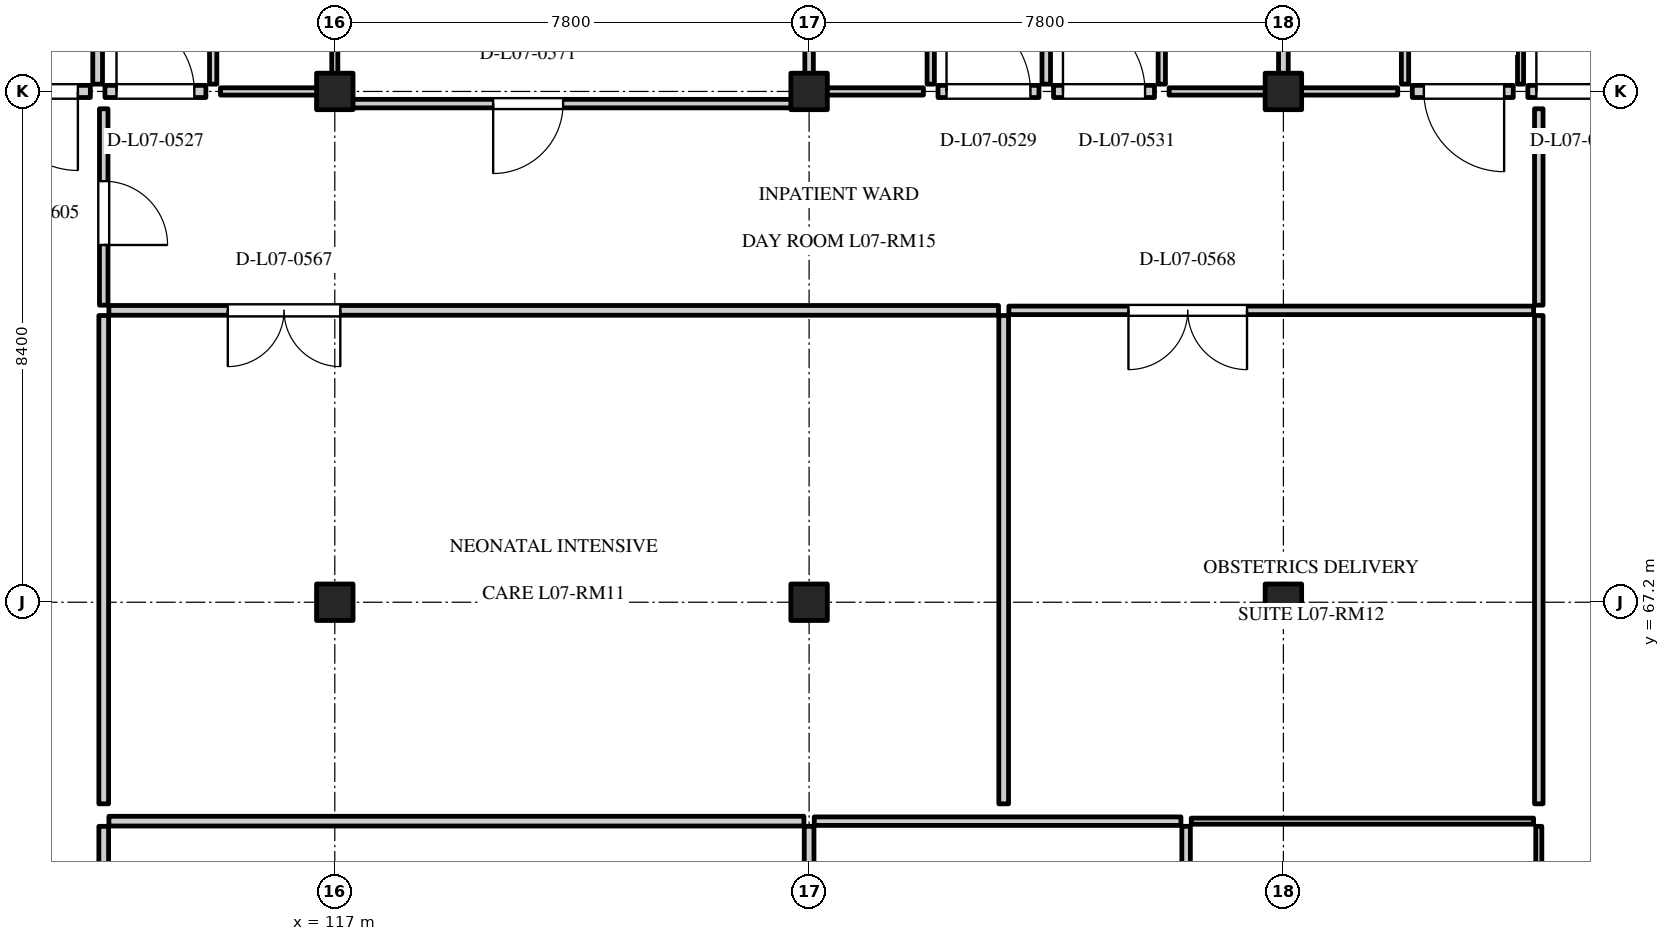
"""IFC4 building model, lengths in metres.
Left out: names, types, materials, properties, quantities, classifications, styles, units other than length and angle.
Written with IfcOpenShell. Run it as: python <this file> out.ifc"""

import sys

from ifc_helpers import new_model, si_unit, direction, frame, frame_2d, origin, origin_2d, place, context, subcontext, project, spatial, rectangle, extrude, element, fill, save


model = new_model("IFC4")
c1 = context("Model", 3, precision=1e-05, world=origin(), true_north=direction((0.0, 1.0)))
c2 = subcontext(c1, "Body", "Model", "MODEL_VIEW")
j1 = project(units=[si_unit("LENGTHUNIT", "METRE"), si_unit("PLANEANGLEUNIT", "RADIAN")], contexts=[c1])
p1 = place(None, origin())
s1 = spatial("IfcSite", under=j1, at=p1, CompositionType="ELEMENT")
p2 = place(p1, origin())
s2 = spatial("IfcBuilding", under=s1, at=p2, CompositionType="ELEMENT")
p3 = place(p2, frame((0.0, 0.0, 29.7)))
s3 = spatial("IfcBuildingStorey", under=s2, at=p3, CompositionType="ELEMENT", Elevation=29.7)
for number, where, z_axis, x_axis in (
    (1, (117.0, 67.2, 0.0), (0.0, 0.0, 1.0), (1.0, 0.0, 0.0)),
    (2, (117.0, 75.6, 0.0), (0.0, 0.0, 1.0), (1.0, 0.0, 0.0)),
    (3, (124.8, 67.2, 0.0), (0.0, 0.0, 1.0), (1.0, 0.0, 0.0)),
    (4, (124.8, 75.6, 0.0), (0.0, 0.0, 1.0), (1.0, 0.0, 0.0)),
    (5, (132.6, 67.2, 0.0), (0.0, 0.0, 1.0), (1.0, 0.0, 0.0)),
    (6, (132.6, 75.6, 0.0), (0.0, 0.0, 1.0), (1.0, 0.0, 0.0)),
):
    element("IfcColumn", number, at=place(p3, frame(where, z_axis=z_axis, x_axis=x_axis)), inside=s3, PredefinedType="COLUMN", context=c2, shape_type="SweptSolid", body=[
        extrude(rectangle(XDim=0.6, YDim=0.6, at=origin_2d()), origin(), (0.0, 0.0, 1.0), 4.2),
    ])
p4 = place(p3, frame((113.1, 75.72, 0.0), z_axis=(0.0, 0.0, 1.0), x_axis=(0.0, 1.0, 0.0)))
e7 = element("IfcWall", 7, at=p4, inside=s3, PredefinedType="PARTITIONING", context=c2, shape_type="SweptSolid", body=[
    extrude(rectangle(XDim=8.16, YDim=0.16, at=frame_2d((4.08, 0.0))), origin(), (0.0, 0.0, 1.0), 3.88),
])
p5 = place(p3, frame((111.32, 75.6, 0.0), z_axis=(0.0, 0.0, 1.0), x_axis=(1.0, 0.0, 0.0)))
e8 = element("IfcWall", 8, at=p5, inside=s3, PredefinedType="STANDARD", context=c2, shape_type="SweptSolid", body=[
    extrude(rectangle(XDim=1.66, YDim=0.2, at=frame_2d((0.83, 0.0))), origin(), (0.0, 0.0, 1.0), 3.25),
])
p6 = place(p5, frame((0.155, 0.0, 0.0)))
e9 = element("IfcOpeningElement", 9, at=p6, cuts=e8, PredefinedType="OPENING", context=c2, shape_type="SweptSolid", body=[
    extrude(rectangle(XDim=1.3, YDim=2.15, at=frame_2d((0.65, 1.075))), frame((0.0, 0.112, 0.0), z_axis=(0.0, -1.0, 0.0), x_axis=(1.0, 0.0, 0.0)), (0.0, 0.0, 1.0), 0.224),
])
p7 = place(p3, frame((117.0, 75.72, 0.0), z_axis=(0.0, 0.0, 1.0), x_axis=(0.0, 1.0, 0.0)))
e10 = element("IfcWall", 10, at=p7, inside=s3, PredefinedType="PARTITIONING", context=c2, shape_type="SweptSolid", body=[
    extrude(rectangle(XDim=8.16, YDim=0.1, at=frame_2d((4.08, 0.0))), origin(), (0.0, 0.0, 1.0), 3.25),
])
p8 = place(p3, frame((113.22, 75.6, 0.0), z_axis=(0.0, 0.0, 1.0), x_axis=(1.0, 0.0, 0.0)))
e11 = element("IfcWall", 11, at=p8, inside=s3, PredefinedType="STANDARD", context=c2, shape_type="SweptSolid", body=[
    extrude(rectangle(XDim=1.66, YDim=0.2, at=frame_2d((0.83, 0.0))), origin(), (0.0, 0.0, 1.0), 3.25),
])
p9 = place(p8, frame((0.19, 0.0, 0.0)))
e12 = element("IfcOpeningElement", 12, at=p9, cuts=e11, PredefinedType="OPENING", context=c2, shape_type="SweptSolid", body=[
    extrude(rectangle(XDim=1.28, YDim=2.15, at=frame_2d((0.64, 1.075))), frame((0.0, 0.112, 0.0), z_axis=(0.0, -1.0, 0.0), x_axis=(1.0, 0.0, 0.0)), (0.0, 0.0, 1.0), 0.224),
])
p10 = place(p3, frame((115.12, 75.6, 0.0), z_axis=(0.0, 0.0, 1.0), x_axis=(1.0, 0.0, 0.0)))
e13 = element("IfcWall", 13, at=p10, inside=s3, PredefinedType="PARTITIONING", context=c2, shape_type="SweptSolid", body=[
    extrude(rectangle(XDim=1.76, YDim=0.12, at=frame_2d((0.88, 0.0))), origin(), (0.0, 0.0, 1.0), 3.25),
])
p11 = place(p3, frame((115.0, 75.72, 0.0), z_axis=(0.0, 0.0, 1.0), x_axis=(0.0, 1.0, 0.0)))
e14 = element("IfcWall", 14, at=p11, inside=s3, PredefinedType="PARTITIONING", context=c2, shape_type="SweptSolid", body=[
    extrude(rectangle(XDim=2.24, YDim=0.12, at=frame_2d((1.12, 0.0))), origin(), (0.0, 0.0, 1.0), 3.88),
])
for number, where, z_axis, x_axis in (
    (15, (124.8, 75.72, 0.0), (0.0, 0.0, 1.0), (0.0, 1.0, 0.0)),
    (16, (128.7, 75.72, 0.0), (0.0, 0.0, 1.0), (0.0, 1.0, 0.0)),
):
    element("IfcWall", number, at=place(p3, frame(where, z_axis=z_axis, x_axis=x_axis)), inside=s3, PredefinedType="PARTITIONING", context=c2, shape_type="SweptSolid", body=[
        extrude(rectangle(XDim=8.16, YDim=0.14, at=frame_2d((4.08, 0.0))), origin(), (0.0, 0.0, 1.0), 3.88),
    ])
p12 = place(p3, frame((126.92, 75.6, 0.0), z_axis=(0.0, 0.0, 1.0), x_axis=(1.0, 0.0, 0.0)))
e17 = element("IfcWall", 17, at=p12, inside=s3, PredefinedType="STANDARD", context=c2, shape_type="SweptSolid", body=[
    extrude(rectangle(XDim=1.66, YDim=0.2, at=frame_2d((0.83, 0.0))), origin(), (0.0, 0.0, 1.0), 3.25),
])
p13 = place(p12, frame((0.14, 0.0, 0.0)))
e18 = element("IfcOpeningElement", 18, at=p13, cuts=e17, PredefinedType="OPENING", context=c2, shape_type="SweptSolid", body=[
    extrude(rectangle(XDim=1.38, YDim=2.2, at=frame_2d((0.69, 1.1))), frame((0.0, 0.112, 0.0), z_axis=(0.0, -1.0, 0.0), x_axis=(1.0, 0.0, 0.0)), (0.0, 0.0, 1.0), 0.224),
])
p14 = place(p3, frame((124.92, 75.6, 0.0), z_axis=(0.0, 0.0, 1.0), x_axis=(1.0, 0.0, 0.0)))
e19 = element("IfcWall", 19, at=p14, inside=s3, PredefinedType="PARTITIONING", context=c2, shape_type="SweptSolid", body=[
    extrude(rectangle(XDim=1.76, YDim=0.12, at=frame_2d((0.88, 0.0))), origin(), (0.0, 0.0, 1.0), 3.25),
])
p15 = place(p3, frame((126.8, 75.72, 0.0), z_axis=(0.0, 0.0, 1.0), x_axis=(0.0, 1.0, 0.0)))
e20 = element("IfcWall", 20, at=p15, inside=s3, PredefinedType="PARTITIONING", context=c2, shape_type="SweptSolid", body=[
    extrude(rectangle(XDim=2.24, YDim=0.12, at=frame_2d((1.12, 0.0))), origin(), (0.0, 0.0, 1.0), 3.88),
])
p16 = place(p3, frame((132.6, 75.72, 0.0), z_axis=(0.0, 0.0, 1.0), x_axis=(0.0, 1.0, 0.0)))
e21 = element("IfcWall", 21, at=p16, inside=s3, PredefinedType="PARTITIONING", context=c2, shape_type="SweptSolid", body=[
    extrude(rectangle(XDim=8.16, YDim=0.16, at=frame_2d((4.08, 0.0))), origin(), (0.0, 0.0, 1.0), 3.25),
])
p17 = place(p3, frame((128.82, 75.6, 0.0), z_axis=(0.0, 0.0, 1.0), x_axis=(1.0, 0.0, 0.0)))
e22 = element("IfcWall", 22, at=p17, inside=s3, PredefinedType="STANDARD", context=c2, shape_type="SweptSolid", body=[
    extrude(rectangle(XDim=1.66, YDim=0.2, at=frame_2d((0.83, 0.0))), origin(), (0.0, 0.0, 1.0), 3.25),
])
p18 = place(p17, frame((0.155, 0.0, 0.0)))
e23 = element("IfcOpeningElement", 23, at=p18, cuts=e22, PredefinedType="OPENING", context=c2, shape_type="SweptSolid", body=[
    extrude(rectangle(XDim=1.35, YDim=2.15, at=frame_2d((0.675, 1.075))), frame((0.0, 0.112, 0.0), z_axis=(0.0, -1.0, 0.0), x_axis=(1.0, 0.0, 0.0)), (0.0, 0.0, 1.0), 0.224),
])
p19 = place(p3, frame((130.72, 75.6, 0.0), z_axis=(0.0, 0.0, 1.0), x_axis=(1.0, 0.0, 0.0)))
e24 = element("IfcWall", 24, at=p19, inside=s3, PredefinedType="PARTITIONING", context=c2, shape_type="SweptSolid", body=[
    extrude(rectangle(XDim=1.76, YDim=0.12, at=frame_2d((0.88, 0.0))), origin(), (0.0, 0.0, 1.0), 3.25),
])
p20 = place(p3, frame((130.6, 75.72, 0.0), z_axis=(0.0, 0.0, 1.0), x_axis=(0.0, 1.0, 0.0)))
e25 = element("IfcWall", 25, at=p20, inside=s3, PredefinedType="PARTITIONING", context=c2, shape_type="SweptSolid", body=[
    extrude(rectangle(XDim=2.24, YDim=0.12, at=frame_2d((1.12, 0.0))), origin(), (0.0, 0.0, 1.0), 3.88),
])
p21 = place(p3, frame((136.5, 75.72, 0.0), z_axis=(0.0, 0.0, 1.0), x_axis=(0.0, 1.0, 0.0)))
e26 = element("IfcWall", 26, at=p21, inside=s3, PredefinedType="PARTITIONING", context=c2, shape_type="SweptSolid", body=[
    extrude(rectangle(XDim=8.16, YDim=0.1, at=frame_2d((4.08, 0.0))), origin(), (0.0, 0.0, 1.0), 3.88),
])
p22 = place(p3, frame((134.72, 75.6, 0.0), z_axis=(0.0, 0.0, 1.0), x_axis=(1.0, 0.0, 0.0)))
e27 = element("IfcWall", 27, at=p22, inside=s3, PredefinedType="STANDARD", context=c2, shape_type="SweptSolid", body=[
    extrude(rectangle(XDim=1.66, YDim=0.2, at=frame_2d((0.83, 0.0))), origin(), (0.0, 0.0, 1.0), 3.25),
])
p23 = place(p22, frame((0.19, 0.0, 0.0)))
e28 = element("IfcOpeningElement", 28, at=p23, cuts=e27, PredefinedType="OPENING", context=c2, shape_type="SweptSolid", body=[
    extrude(rectangle(XDim=1.32, YDim=2.2, at=frame_2d((0.66, 1.1))), frame((0.0, 0.112, 0.0), z_axis=(0.0, -1.0, 0.0), x_axis=(1.0, 0.0, 0.0)), (0.0, 0.0, 1.0), 0.224),
])
p24 = place(p3, frame((132.72, 75.6, 0.0), z_axis=(0.0, 0.0, 1.0), x_axis=(1.0, 0.0, 0.0)))
e29 = element("IfcWall", 29, at=p24, inside=s3, PredefinedType="PARTITIONING", context=c2, shape_type="SweptSolid", body=[
    extrude(rectangle(XDim=1.76, YDim=0.12, at=frame_2d((0.88, 0.0))), origin(), (0.0, 0.0, 1.0), 3.25),
])
p25 = place(p3, frame((134.6, 75.72, 0.0), z_axis=(0.0, 0.0, 1.0), x_axis=(0.0, 1.0, 0.0)))
e30 = element("IfcWall", 30, at=p25, inside=s3, PredefinedType="PARTITIONING", context=c2, shape_type="SweptSolid", body=[
    extrude(rectangle(XDim=2.24, YDim=0.12, at=frame_2d((1.12, 0.0))), origin(), (0.0, 0.0, 1.0), 3.88),
])
p26 = place(p3, frame((136.62, 75.6, 0.0), z_axis=(0.0, 0.0, 1.0), x_axis=(1.0, 0.0, 0.0)))
e31 = element("IfcWall", 31, at=p26, inside=s3, PredefinedType="STANDARD", context=c2, shape_type="SweptSolid", body=[
    extrude(rectangle(XDim=1.66, YDim=0.2, at=frame_2d((0.83, 0.0))), origin(), (0.0, 0.0, 1.0), 3.25),
])
p27 = place(p26, frame((0.14, 0.0, 0.0)))
e32 = element("IfcOpeningElement", 32, at=p27, cuts=e31, PredefinedType="OPENING", context=c2, shape_type="SweptSolid", body=[
    extrude(rectangle(XDim=1.38, YDim=2.2, at=frame_2d((0.69, 1.1))), frame((0.0, 0.112, 0.0), z_axis=(0.0, -1.0, 0.0), x_axis=(1.0, 0.0, 0.0)), (0.0, 0.0, 1.0), 0.224),
])
p28 = place(p3, frame((113.285, 63.6, 0.0), z_axis=(0.0, 0.0, 1.0), x_axis=(1.0, 0.0, 0.0)))
e33 = element("IfcWall", 33, at=p28, inside=s3, PredefinedType="PARTITIONING", context=c2, shape_type="SweptSolid", body=[
    extrude(rectangle(XDim=11.43, YDim=0.16, at=frame_2d((5.715, 0.0))), origin(), (0.0, 0.0, 1.0), 3.88),
])
for number, where, z_axis, x_axis in (
    (34, (113.2, 54.085, 0.0), (0.0, 0.0, 1.0), (0.0, 1.0, 0.0)),
    (35, (124.8, 54.085, 0.0), (0.0, 0.0, 1.0), (0.0, 1.0, 0.0)),
):
    element("IfcWall", number, at=place(p3, frame(where, z_axis=z_axis, x_axis=x_axis)), inside=s3, PredefinedType="PARTITIONING", context=c2, shape_type="SweptSolid", body=[
        extrude(rectangle(XDim=9.43, YDim=0.16, at=frame_2d((4.715, 0.0))), origin(), (0.0, 0.0, 1.0), 3.88),
    ])
p29 = place(p3, frame((124.885, 63.6, 0.0), z_axis=(0.0, 0.0, 1.0), x_axis=(1.0, 0.0, 0.0)))
e36 = element("IfcWall", 36, at=p29, inside=s3, PredefinedType="PARTITIONING", context=c2, shape_type="SweptSolid", body=[
    extrude(rectangle(XDim=6.03, YDim=0.14, at=frame_2d((3.015, 0.0))), origin(), (0.0, 0.0, 1.0), 3.88),
])
p30 = place(p3, frame((131.0, 54.085, 0.0), z_axis=(0.0, 0.0, 1.0), x_axis=(0.0, 1.0, 0.0)))
e37 = element("IfcWall", 37, at=p30, inside=s3, PredefinedType="PARTITIONING", context=c2, shape_type="SweptSolid", body=[
    extrude(rectangle(XDim=9.43, YDim=0.14, at=frame_2d((4.715, 0.0))), origin(), (0.0, 0.0, 1.0), 3.88),
])
p31 = place(p3, frame((131.085, 63.6, 0.0), z_axis=(0.0, 0.0, 1.0), x_axis=(1.0, 0.0, 0.0)))
e38 = element("IfcWall", 38, at=p31, inside=s3, PredefinedType="PARTITIONING", context=c2, shape_type="SweptSolid", body=[
    extrude(rectangle(XDim=5.63, YDim=0.1, at=frame_2d((2.815, 0.0))), origin(), (0.0, 0.0, 1.0), 3.88),
])
p32 = place(p3, frame((136.8, 54.085, 0.0), z_axis=(0.0, 0.0, 1.0), x_axis=(0.0, 1.0, 0.0)))
e39 = element("IfcWall", 39, at=p32, inside=s3, PredefinedType="PARTITIONING", context=c2, shape_type="SweptSolid", body=[
    extrude(rectangle(XDim=9.43, YDim=0.1, at=frame_2d((4.715, 0.0))), origin(), (0.0, 0.0, 1.0), 3.88),
])
p33 = place(p3, frame((113.285, 72.0, 0.0), z_axis=(0.0, 0.0, 1.0), x_axis=(1.0, 0.0, 0.0)))
e40 = element("IfcWall", 40, at=p33, inside=s3, PredefinedType="PARTITIONING", context=c2, shape_type="SweptSolid", body=[
    extrude(rectangle(XDim=14.63, YDim=0.16, at=frame_2d((7.315, 0.0))), origin(), (0.0, 0.0, 1.0), 3.88),
])
p34 = place(p33, frame((1.956, 0.0, 0.0)))
e41 = element("IfcOpeningElement", 41, at=p34, cuts=e40, PredefinedType="OPENING", context=c2, shape_type="SweptSolid", body=[
    extrude(rectangle(XDim=1.85, YDim=2.3, at=frame_2d((0.925, 1.15))), frame((0.0, 0.092, 0.0), z_axis=(0.0, -1.0, 0.0), x_axis=(1.0, 0.0, 0.0)), (0.0, 0.0, 1.0), 0.184),
])
for number, where, z_axis, x_axis in (
    (42, (113.2, 63.885, 0.0), (0.0, 0.0, 1.0), (0.0, 1.0, 0.0)),
    (43, (128.0, 63.885, 0.0), (0.0, 0.0, 1.0), (0.0, 1.0, 0.0)),
):
    element("IfcWall", number, at=place(p3, frame(where, z_axis=z_axis, x_axis=x_axis)), inside=s3, PredefinedType="PARTITIONING", context=c2, shape_type="SweptSolid", body=[
        extrude(rectangle(XDim=8.03, YDim=0.16, at=frame_2d((4.015, 0.0))), origin(), (0.0, 0.0, 1.0), 3.88),
    ])
p35 = place(p3, frame((128.085, 72.0, 0.0), z_axis=(0.0, 0.0, 1.0), x_axis=(1.0, 0.0, 0.0)))
e44 = element("IfcWall", 44, at=p35, inside=s3, PredefinedType="PARTITIONING", context=c2, shape_type="SweptSolid", body=[
    extrude(rectangle(XDim=8.63, YDim=0.14, at=frame_2d((4.315, 0.0))), origin(), (0.0, 0.0, 1.0), 3.88),
])
p36 = place(p35, frame((1.967, 0.0, 0.0)))
e45 = element("IfcOpeningElement", 45, at=p36, cuts=e44, PredefinedType="OPENING", context=c2, shape_type="SweptSolid", body=[
    extrude(rectangle(XDim=1.95, YDim=2.35, at=frame_2d((0.975, 1.175))), frame((0.0, 0.082, 0.0), z_axis=(0.0, -1.0, 0.0), x_axis=(1.0, 0.0, 0.0)), (0.0, 0.0, 1.0), 0.164),
])
p37 = place(p3, frame((136.8, 63.885, 0.0), z_axis=(0.0, 0.0, 1.0), x_axis=(0.0, 1.0, 0.0)))
e46 = element("IfcWall", 46, at=p37, inside=s3, PredefinedType="PARTITIONING", context=c2, shape_type="SweptSolid", body=[
    extrude(rectangle(XDim=8.03, YDim=0.14, at=frame_2d((4.015, 0.0))), origin(), (0.0, 0.0, 1.0), 3.88),
])
p38 = place(p3, frame((116.92, 75.4, 0.0), z_axis=(0.0, 0.0, 1.0), x_axis=(1.0, 0.0, 0.0)))
e47 = element("IfcWall", 47, at=p38, inside=s3, PredefinedType="PARTITIONING", context=c2, shape_type="SweptSolid", body=[
    extrude(rectangle(XDim=7.96, YDim=0.14, at=frame_2d((3.98, 0.0))), origin(), (0.0, 0.0, 1.0), 3.25),
])
p39 = place(p38, frame((2.684, 0.0, 0.0)))
e48 = element("IfcOpeningElement", 48, at=p39, cuts=e47, PredefinedType="OPENING", context=c2, shape_type="SweptSolid", body=[
    extrude(rectangle(XDim=1.15, YDim=2.15, at=frame_2d((0.575, 1.075))), frame((0.0, 0.082, 0.0), z_axis=(0.0, -1.0, 0.0), x_axis=(1.0, 0.0, 0.0)), (0.0, 0.0, 1.0), 0.164),
])
p40 = place(p3, frame((113.2, 72.085, 0.0), z_axis=(0.0, 0.0, 1.0), x_axis=(0.0, 1.0, 0.0)))
e49 = element("IfcWall", 49, at=p40, inside=s3, PredefinedType="PARTITIONING", context=c2, shape_type="SweptSolid", body=[
    extrude(rectangle(XDim=3.23, YDim=0.14, at=frame_2d((1.615, 0.0))), origin(), (0.0, 0.0, 1.0), 3.88),
])
p41 = place(p40, frame((0.99, 0.0, 0.0)))
e50 = element("IfcOpeningElement", 50, at=p41, cuts=e49, PredefinedType="OPENING", context=c2, shape_type="SweptSolid", body=[
    extrude(rectangle(XDim=1.05, YDim=2.1, at=frame_2d((0.525, 1.05))), frame((0.0, 0.082, 0.0), z_axis=(0.0, -1.0, 0.0), x_axis=(1.0, 0.0, 0.0)), (0.0, 0.0, 1.0), 0.164),
])
p42 = place(p3, frame((136.8, 72.085, 0.0), z_axis=(0.0, 0.0, 1.0), x_axis=(0.0, 1.0, 0.0)))
e51 = element("IfcWall", 51, at=p42, inside=s3, PredefinedType="PARTITIONING", context=c2, shape_type="SweptSolid", body=[
    extrude(rectangle(XDim=3.23, YDim=0.14, at=frame_2d((1.615, 0.0))), origin(), (0.0, 0.0, 1.0), 3.88),
])
p43 = place(p6, origin())
e52 = element("IfcDoor", 52, at=p43, inside=s3, OperationType="SINGLE_SWING_RIGHT", PredefinedType="DOOR", context=c2, shape_type="SweptSolid", body=[
    extrude(rectangle(XDim=1.3, YDim=2.15, at=frame_2d((0.65, 1.075))), frame((0.0, 0.025, 0.0), z_axis=(0.0, -1.0, 0.0), x_axis=(1.0, 0.0, 0.0)), (0.0, 0.0, 1.0), 0.05),
])
fill(e9, e52)
p44 = place(p9, origin())
e53 = element("IfcDoor", 53, at=p44, inside=s3, OperationType="SINGLE_SWING_LEFT", PredefinedType="DOOR", context=c2, shape_type="SweptSolid", body=[
    extrude(rectangle(XDim=1.28, YDim=2.15, at=frame_2d((0.64, 1.075))), frame((0.0, 0.025, 0.0), z_axis=(0.0, -1.0, 0.0), x_axis=(1.0, 0.0, 0.0)), (0.0, 0.0, 1.0), 0.05),
])
fill(e12, e53)
p45 = place(p13, origin())
e54 = element("IfcDoor", 54, at=p45, inside=s3, OperationType="SINGLE_SWING_LEFT", PredefinedType="DOOR", context=c2, shape_type="SweptSolid", body=[
    extrude(rectangle(XDim=1.38, YDim=2.2, at=frame_2d((0.69, 1.1))), frame((0.0, 0.025, 0.0), z_axis=(0.0, -1.0, 0.0), x_axis=(1.0, 0.0, 0.0)), (0.0, 0.0, 1.0), 0.05),
])
fill(e18, e54)
p46 = place(p18, origin())
e55 = element("IfcDoor", 55, at=p46, inside=s3, OperationType="SINGLE_SWING_LEFT", PredefinedType="DOOR", context=c2, shape_type="SweptSolid", body=[
    extrude(rectangle(XDim=1.35, YDim=2.15, at=frame_2d((0.675, 1.075))), frame((0.0, 0.025, 0.0), z_axis=(0.0, -1.0, 0.0), x_axis=(1.0, 0.0, 0.0)), (0.0, 0.0, 1.0), 0.05),
])
fill(e23, e55)
p47 = place(p23, origin())
e56 = element("IfcDoor", 56, at=p47, inside=s3, OperationType="SINGLE_SWING_RIGHT", PredefinedType="DOOR", context=c2, shape_type="SweptSolid", body=[
    extrude(rectangle(XDim=1.32, YDim=2.2, at=frame_2d((0.66, 1.1))), frame((0.0, 0.025, 0.0), z_axis=(0.0, -1.0, 0.0), x_axis=(1.0, 0.0, 0.0)), (0.0, 0.0, 1.0), 0.05),
])
fill(e28, e56)
p48 = place(p27, origin())
e57 = element("IfcDoor", 57, at=p48, inside=s3, OperationType="SINGLE_SWING_LEFT", PredefinedType="DOOR", context=c2, shape_type="SweptSolid", body=[
    extrude(rectangle(XDim=1.38, YDim=2.2, at=frame_2d((0.69, 1.1))), frame((0.0, 0.025, 0.0), z_axis=(0.0, -1.0, 0.0), x_axis=(1.0, 0.0, 0.0)), (0.0, 0.0, 1.0), 0.05),
])
fill(e32, e57)
p49 = place(p34, frame((1.85, 0.0, 0.0), z_axis=(0.0, 0.0, 1.0), x_axis=(-1.0, 0.0, 0.0)))
e58 = element("IfcDoor", 58, at=p49, inside=s3, OperationType="DOUBLE_DOOR_SINGLE_SWING", PredefinedType="DOOR", context=c2, shape_type="SweptSolid", body=[
    extrude(rectangle(XDim=1.85, YDim=2.3, at=frame_2d((0.925, 1.15))), frame((0.0, 0.025, 0.0), z_axis=(0.0, -1.0, 0.0), x_axis=(1.0, 0.0, 0.0)), (0.0, 0.0, 1.0), 0.05),
])
fill(e41, e58)
p50 = place(p36, frame((1.95, 0.0, 0.0), z_axis=(0.0, 0.0, 1.0), x_axis=(-1.0, 0.0, 0.0)))
e59 = element("IfcDoor", 59, at=p50, inside=s3, OperationType="DOUBLE_DOOR_SINGLE_SWING", PredefinedType="DOOR", context=c2, shape_type="SweptSolid", body=[
    extrude(rectangle(XDim=1.95, YDim=2.35, at=frame_2d((0.975, 1.175))), frame((0.0, 0.025, 0.0), z_axis=(0.0, -1.0, 0.0), x_axis=(1.0, 0.0, 0.0)), (0.0, 0.0, 1.0), 0.05),
])
fill(e45, e59)
p51 = place(p39, frame((1.15, 0.0, 0.0), z_axis=(0.0, 0.0, 1.0), x_axis=(-1.0, 0.0, 0.0)))
e60 = element("IfcDoor", 60, at=p51, inside=s3, OperationType="SINGLE_SWING_RIGHT", PredefinedType="DOOR", context=c2, shape_type="SweptSolid", body=[
    extrude(rectangle(XDim=1.15, YDim=2.15, at=frame_2d((0.575, 1.075))), frame((0.0, 0.025, 0.0), z_axis=(0.0, -1.0, 0.0), x_axis=(1.0, 0.0, 0.0)), (0.0, 0.0, 1.0), 0.05),
])
fill(e48, e60)
p52 = place(p41, frame((1.05, 0.0, 0.0), z_axis=(0.0, 0.0, 1.0), x_axis=(-1.0, 0.0, 0.0)))
e61 = element("IfcDoor", 61, at=p52, inside=s3, OperationType="SINGLE_SWING_RIGHT", PredefinedType="DOOR", context=c2, shape_type="SweptSolid", body=[
    extrude(rectangle(XDim=1.05, YDim=2.1, at=frame_2d((0.525, 1.05))), frame((0.0, 0.025, 0.0), z_axis=(0.0, -1.0, 0.0), x_axis=(1.0, 0.0, 0.0)), (0.0, 0.0, 1.0), 0.05),
])
fill(e50, e61)
save(model, sys.argv[1])
